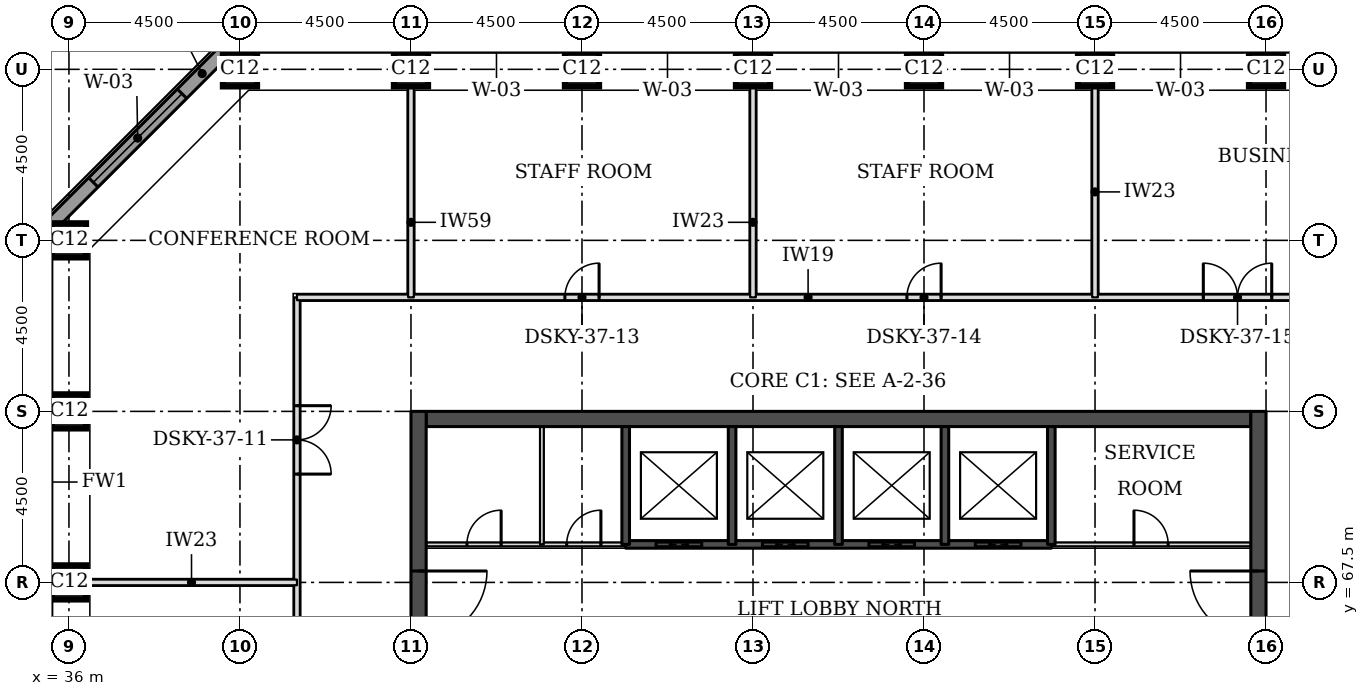
"""IFC4 building model, lengths in metres.
Left out: names, types, materials, properties, quantities, classifications, styles, units other than length and angle.
Written with IfcOpenShell. Run it as: python <this file> out.ifc"""

import sys

from ifc_helpers import new_model, si_unit, direction, frame, frame_2d, origin, origin_2d, place, context, subcontext, project, spatial, rectangle, extrude, element, fill, save


model = new_model("IFC4")
c1 = context("Model", 3, precision=1e-05, world=origin(), true_north=direction((0.0, 1.0)))
c2 = subcontext(c1, "Body", "Model", "MODEL_VIEW")
j1 = project(units=[si_unit("LENGTHUNIT", "METRE"), si_unit("PLANEANGLEUNIT", "RADIAN")], contexts=[c1])
p1 = place(None, origin())
s1 = spatial("IfcSite", under=j1, at=p1, CompositionType="ELEMENT")
p2 = place(p1, origin())
s2 = spatial("IfcBuilding", under=s1, at=p2, CompositionType="ELEMENT")
p3 = place(p2, frame((0.0, 0.0, 143.1)))
s3 = spatial("IfcBuildingStorey", under=s2, at=p3, CompositionType="ELEMENT", Elevation=143.1)
for number, where, z_axis, x_axis in (
    (1, (36.0, 67.5, 0.0), (0.0, 0.0, 1.0), (1.0, 0.0, 0.0)),
    (2, (36.0, 72.0, 0.0), (0.0, 0.0, 1.0), (1.0, 0.0, 0.0)),
    (3, (36.0, 76.5, 0.0), (0.0, 0.0, 1.0), (1.0, 0.0, 0.0)),
    (4, (40.5, 81.0, 0.0), (0.0, 0.0, 1.0), (1.0, 0.0, 0.0)),
    (5, (45.0, 81.0, 0.0), (0.0, 0.0, 1.0), (1.0, 0.0, 0.0)),
    (6, (49.5, 81.0, 0.0), (0.0, 0.0, 1.0), (1.0, 0.0, 0.0)),
    (7, (54.0, 81.0, 0.0), (0.0, 0.0, 1.0), (1.0, 0.0, 0.0)),
    (8, (58.5, 81.0, 0.0), (0.0, 0.0, 1.0), (1.0, 0.0, 0.0)),
    (9, (63.0, 81.0, 0.0), (0.0, 0.0, 1.0), (1.0, 0.0, 0.0)),
    (10, (67.5, 81.0, 0.0), (0.0, 0.0, 1.0), (1.0, 0.0, 0.0)),
):
    element("IfcColumn", number, at=place(p3, frame(where, z_axis=z_axis, x_axis=x_axis)), inside=s3, PredefinedType="COLUMN", context=c2, shape_type="SweptSolid", body=[
        extrude(rectangle(XDim=0.9, YDim=0.9, at=origin_2d()), origin(), (0.0, 0.0, 1.0), 4.6),
    ])
p4 = place(p3, frame((45.4, 71.8, 0.0), z_axis=(0.0, 0.0, 1.0), x_axis=(1.0, 0.0, 0.0)))
e11 = element("IfcWall", 11, at=p4, inside=s3, PredefinedType="SHEAR", context=c2, shape_type="SweptSolid", body=[
    extrude(rectangle(XDim=21.7, YDim=0.4, at=frame_2d((10.85, 0.0))), origin(), (0.0, 0.0, 1.0), 4.6),
])
p5 = place(p3, frame((45.2, 49.5, 0.0), z_axis=(0.0, 0.0, 1.0), x_axis=(0.0, 1.0, 0.0)))
e12 = element("IfcWall", 12, at=p5, inside=s3, PredefinedType="SHEAR", context=c2, shape_type="SweptSolid", body=[
    extrude(rectangle(XDim=22.5, YDim=0.4, at=frame_2d((11.25, 0.0))), origin(), (0.0, 0.0, 1.0), 4.6),
])
p6 = place(p5, frame((4.2, 0.0, 0.0)))
e13 = element("IfcOpeningElement", 13, at=p6, cuts=e12, PredefinedType="OPENING", context=c2, shape_type="SweptSolid", body=[
    extrude(rectangle(XDim=1.8, YDim=2.1, at=frame_2d((0.9, 1.05))), frame((0.0, 0.21, 0.0), z_axis=(0.0, -1.0, 0.0), x_axis=(1.0, 0.0, 0.0)), (0.0, 0.0, 1.0), 0.42),
])
p7 = place(p5, frame((6.9, 0.0, 0.0)))
e14 = element("IfcOpeningElement", 14, at=p7, cuts=e12, PredefinedType="OPENING", context=c2, shape_type="SweptSolid", body=[
    extrude(rectangle(XDim=1.1, YDim=2.1, at=frame_2d((0.55, 1.05))), frame((0.0, 0.21, 0.0), z_axis=(0.0, -1.0, 0.0), x_axis=(1.0, 0.0, 0.0)), (0.0, 0.0, 1.0), 0.42),
])
p8 = place(p5, frame((13.6, 0.0, 0.0)))
e15 = element("IfcOpeningElement", 15, at=p8, cuts=e12, PredefinedType="OPENING", context=c2, shape_type="SweptSolid", body=[
    extrude(rectangle(XDim=1.1, YDim=2.1, at=frame_2d((0.55, 1.05))), frame((0.0, 0.21, 0.0), z_axis=(0.0, -1.0, 0.0), x_axis=(1.0, 0.0, 0.0)), (0.0, 0.0, 1.0), 0.42),
])
p9 = place(p5, frame((16.5, 0.0, 0.0)))
e16 = element("IfcOpeningElement", 16, at=p9, cuts=e12, PredefinedType="OPENING", context=c2, shape_type="SweptSolid", body=[
    extrude(rectangle(XDim=1.8, YDim=2.1, at=frame_2d((0.9, 1.05))), frame((0.0, 0.21, 0.0), z_axis=(0.0, -1.0, 0.0), x_axis=(1.0, 0.0, 0.0)), (0.0, 0.0, 1.0), 0.42),
])
p10 = place(p3, frame((67.3, 49.5, 0.0), z_axis=(0.0, 0.0, 1.0), x_axis=(0.0, 1.0, 0.0)))
e17 = element("IfcWall", 17, at=p10, inside=s3, PredefinedType="SHEAR", context=c2, shape_type="SweptSolid", body=[
    extrude(rectangle(XDim=22.5, YDim=0.4, at=frame_2d((11.25, 0.0))), origin(), (0.0, 0.0, 1.0), 4.6),
])
p11 = place(p10, frame((4.2, 0.0, 0.0)))
e18 = element("IfcOpeningElement", 18, at=p11, cuts=e17, PredefinedType="OPENING", context=c2, shape_type="SweptSolid", body=[
    extrude(rectangle(XDim=1.8, YDim=2.1, at=frame_2d((0.9, 1.05))), frame((0.0, 0.21, 0.0), z_axis=(0.0, -1.0, 0.0), x_axis=(1.0, 0.0, 0.0)), (0.0, 0.0, 1.0), 0.42),
])
p12 = place(p10, frame((6.9, 0.0, 0.0)))
e19 = element("IfcOpeningElement", 19, at=p12, cuts=e17, PredefinedType="OPENING", context=c2, shape_type="SweptSolid", body=[
    extrude(rectangle(XDim=1.1, YDim=2.1, at=frame_2d((0.55, 1.05))), frame((0.0, 0.21, 0.0), z_axis=(0.0, -1.0, 0.0), x_axis=(1.0, 0.0, 0.0)), (0.0, 0.0, 1.0), 0.42),
])
p13 = place(p10, frame((13.6, 0.0, 0.0)))
e20 = element("IfcOpeningElement", 20, at=p13, cuts=e17, PredefinedType="OPENING", context=c2, shape_type="SweptSolid", body=[
    extrude(rectangle(XDim=1.1, YDim=2.1, at=frame_2d((0.55, 1.05))), frame((0.0, 0.21, 0.0), z_axis=(0.0, -1.0, 0.0), x_axis=(1.0, 0.0, 0.0)), (0.0, 0.0, 1.0), 0.42),
])
p14 = place(p10, frame((16.5, 0.0, 0.0)))
e21 = element("IfcOpeningElement", 21, at=p14, cuts=e17, PredefinedType="OPENING", context=c2, shape_type="SweptSolid", body=[
    extrude(rectangle(XDim=1.8, YDim=2.1, at=frame_2d((0.9, 1.05))), frame((0.0, 0.21, 0.0), z_axis=(0.0, -1.0, 0.0), x_axis=(1.0, 0.0, 0.0)), (0.0, 0.0, 1.0), 0.42),
])
p15 = place(p3, frame((40.292, 81.676, 0.0), z_axis=(0.0, 0.0, 1.0), x_axis=(-0.707106781187, -0.707106781187, 0.0)))
e22 = element("IfcWall", 22, at=p15, inside=s3, PredefinedType="STANDARD", context=c2, shape_type="SweptSolid", body=[
    extrude(rectangle(XDim=7.027, YDim=0.35, at=frame_2d((3.513, 0.0))), origin(), (0.0, 0.0, 1.0), 4.425),
])
p16 = place(p15, frame((1.863, 0.0, 0.9)))
e23 = element("IfcOpeningElement", 23, at=p16, cuts=e22, PredefinedType="OPENING", context=c2, shape_type="SweptSolid", body=[
    extrude(rectangle(XDim=3.3, YDim=2.7, at=frame_2d((1.65, 1.35))), frame((0.0, 0.185, 0.0), z_axis=(0.0, -1.0, 0.0), x_axis=(1.0, 0.0, 0.0)), (0.0, 0.0, 1.0), 0.37),
])
p17 = place(p3, frame((42.0, 53.25, 0.0), z_axis=(0.0, 0.0, 1.0), x_axis=(0.0, 1.0, 0.0)))
e24 = element("IfcWall", 24, at=p17, inside=s3, PredefinedType="PARTITIONING", context=c2, shape_type="SweptSolid", body=[
    extrude(rectangle(XDim=21.75, YDim=0.15, at=frame_2d((10.875, 0.0))), origin(), (0.0, 0.0, 1.0), 4.45),
])
p18 = place(p17, frame((2.175, 0.0, 0.0)))
e25 = element("IfcOpeningElement", 25, at=p18, cuts=e24, PredefinedType="OPENING", context=c2, shape_type="SweptSolid", body=[
    extrude(rectangle(XDim=0.9, YDim=2.1, at=frame_2d((0.45, 1.05))), frame((0.0, 0.085, 0.0), z_axis=(0.0, -1.0, 0.0), x_axis=(1.0, 0.0, 0.0)), (0.0, 0.0, 1.0), 0.17),
])
p19 = place(p17, frame((9.3, 0.0, 0.0)))
e26 = element("IfcOpeningElement", 26, at=p19, cuts=e24, PredefinedType="OPENING", context=c2, shape_type="SweptSolid", body=[
    extrude(rectangle(XDim=0.9, YDim=2.1, at=frame_2d((0.45, 1.05))), frame((0.0, 0.085, 0.0), z_axis=(0.0, -1.0, 0.0), x_axis=(1.0, 0.0, 0.0)), (0.0, 0.0, 1.0), 0.17),
])
p20 = place(p17, frame((17.1, 0.0, 0.0)))
e27 = element("IfcOpeningElement", 27, at=p20, cuts=e24, PredefinedType="OPENING", context=c2, shape_type="SweptSolid", body=[
    extrude(rectangle(XDim=1.8, YDim=2.1, at=frame_2d((0.9, 1.05))), frame((0.0, 0.085, 0.0), z_axis=(0.0, -1.0, 0.0), x_axis=(1.0, 0.0, 0.0)), (0.0, 0.0, 1.0), 0.17),
])
p21 = place(p3, frame((42.0, 75.0, 0.0), z_axis=(0.0, 0.0, 1.0), x_axis=(1.0, 0.0, 0.0)))
e28 = element("IfcWall", 28, at=p21, inside=s3, PredefinedType="PARTITIONING", context=c2, shape_type="SweptSolid", body=[
    extrude(rectangle(XDim=28.5, YDim=0.15, at=frame_2d((14.25, 0.0))), origin(), (0.0, 0.0, 1.0), 4.45),
])
p22 = place(p21, frame((23.85, 0.0, 0.0)))
e29 = element("IfcOpeningElement", 29, at=p22, cuts=e28, PredefinedType="OPENING", context=c2, shape_type="SweptSolid", body=[
    extrude(rectangle(XDim=1.8, YDim=2.4, at=frame_2d((0.9, 1.2))), frame((0.0, 0.085, 0.0), z_axis=(0.0, -1.0, 0.0), x_axis=(1.0, 0.0, 0.0)), (0.0, 0.0, 1.0), 0.17),
])
p23 = place(p21, frame((7.05, 0.0, 0.0)))
e30 = element("IfcOpeningElement", 30, at=p23, cuts=e28, PredefinedType="OPENING", context=c2, shape_type="SweptSolid", body=[
    extrude(rectangle(XDim=0.9, YDim=2.1, at=frame_2d((0.45, 1.05))), frame((0.0, 0.085, 0.0), z_axis=(0.0, -1.0, 0.0), x_axis=(1.0, 0.0, 0.0)), (0.0, 0.0, 1.0), 0.17),
])
p24 = place(p21, frame((16.05, 0.0, 0.0)))
e31 = element("IfcOpeningElement", 31, at=p24, cuts=e28, PredefinedType="OPENING", context=c2, shape_type="SweptSolid", body=[
    extrude(rectangle(XDim=0.9, YDim=2.1, at=frame_2d((0.45, 1.05))), frame((0.0, 0.085, 0.0), z_axis=(0.0, -1.0, 0.0), x_axis=(1.0, 0.0, 0.0)), (0.0, 0.0, 1.0), 0.17),
])
p25 = place(p3, frame((36.45, 67.5, 0.0), z_axis=(0.0, 0.0, 1.0), x_axis=(1.0, 0.0, 0.0)))
e32 = element("IfcWall", 32, at=p25, inside=s3, PredefinedType="PARTITIONING", context=c2, shape_type="SweptSolid", body=[
    extrude(rectangle(XDim=5.55, YDim=0.15, at=frame_2d((2.775, 0.0))), origin(), (0.0, 0.0, 1.0), 4.45),
])
p26 = place(p3, frame((45.0, 75.0, 0.0), z_axis=(0.0, 0.0, 1.0), x_axis=(0.0, 1.0, 0.0)))
e33 = element("IfcWall", 33, at=p26, inside=s3, PredefinedType="PARTITIONING", context=c2, shape_type="SweptSolid", body=[
    extrude(rectangle(XDim=5.55, YDim=0.15, at=frame_2d((2.775, 0.0))), origin(), (0.0, 0.0, 1.0), 3.922),
])
for number, where, z_axis, x_axis in (
    (34, (54.0, 75.0, 0.0), (0.0, 0.0, 1.0), (0.0, 1.0, 0.0)),
    (35, (63.0, 75.0, 0.0), (0.0, 0.0, 1.0), (0.0, 1.0, 0.0)),
):
    element("IfcWall", number, at=place(p3, frame(where, z_axis=z_axis, x_axis=x_axis)), inside=s3, PredefinedType="PARTITIONING", context=c2, shape_type="SweptSolid", body=[
        extrude(rectangle(XDim=5.55, YDim=0.15, at=frame_2d((2.775, 0.0))), origin(), (0.0, 0.0, 1.0), 4.45),
    ])
p27 = place(p3, frame((45.4, 68.5, 0.0), z_axis=(0.0, 0.0, 1.0), x_axis=(1.0, 0.0, 0.0)))
e36 = element("IfcWall", 36, at=p27, inside=s3, PredefinedType="PARTITIONING", context=c2, shape_type="SweptSolid", body=[
    extrude(rectangle(XDim=5.25, YDim=0.1, at=frame_2d((2.625, 0.0))), origin(), (0.0, 0.0, 1.0), 4.45),
])
p28 = place(p27, frame((1.073, 0.0, 0.0)))
e37 = element("IfcOpeningElement", 37, at=p28, cuts=e36, PredefinedType="OPENING", context=c2, shape_type="SweptSolid", body=[
    extrude(rectangle(XDim=0.9, YDim=2.1, at=frame_2d((0.45, 1.05))), frame((0.0, 0.06, 0.0), z_axis=(0.0, -1.0, 0.0), x_axis=(1.0, 0.0, 0.0)), (0.0, 0.0, 1.0), 0.12),
])
p29 = place(p27, frame((3.698, 0.0, 0.0)))
e38 = element("IfcOpeningElement", 38, at=p29, cuts=e36, PredefinedType="OPENING", context=c2, shape_type="SweptSolid", body=[
    extrude(rectangle(XDim=0.9, YDim=2.1, at=frame_2d((0.45, 1.05))), frame((0.0, 0.06, 0.0), z_axis=(0.0, -1.0, 0.0), x_axis=(1.0, 0.0, 0.0)), (0.0, 0.0, 1.0), 0.12),
])
p30 = place(p3, frame((61.85, 68.5, 0.0), z_axis=(0.0, 0.0, 1.0), x_axis=(1.0, 0.0, 0.0)))
e39 = element("IfcWall", 39, at=p30, inside=s3, PredefinedType="PARTITIONING", context=c2, shape_type="SweptSolid", body=[
    extrude(rectangle(XDim=5.25, YDim=0.1, at=frame_2d((2.625, 0.0))), origin(), (0.0, 0.0, 1.0), 4.45),
])
p31 = place(p30, frame((2.175, 0.0, 0.0)))
e40 = element("IfcOpeningElement", 40, at=p31, cuts=e39, PredefinedType="OPENING", context=c2, shape_type="SweptSolid", body=[
    extrude(rectangle(XDim=0.9, YDim=2.1, at=frame_2d((0.45, 1.05))), frame((0.0, 0.06, 0.0), z_axis=(0.0, -1.0, 0.0), x_axis=(1.0, 0.0, 0.0)), (0.0, 0.0, 1.0), 0.12),
])
p32 = place(p3, frame((50.65, 68.5, 0.0), z_axis=(0.0, 0.0, 1.0), x_axis=(1.0, 0.0, 0.0)))
e41 = element("IfcWall", 41, at=p32, inside=s3, PredefinedType="SOLIDWALL", context=c2, shape_type="SweptSolid", body=[
    extrude(rectangle(XDim=11.2, YDim=0.2, at=frame_2d((5.6, 0.0))), origin(), (0.0, 0.0, 1.0), 4.45),
])
p33 = place(p32, frame((0.8, 0.0, 0.0)))
e42 = element("IfcOpeningElement", 42, at=p33, cuts=e41, PredefinedType="OPENING", context=c2, shape_type="SweptSolid", body=[
    extrude(rectangle(XDim=1.2, YDim=2.1, at=frame_2d((0.6, 1.05))), frame((0.0, 0.11, 0.0), z_axis=(0.0, -1.0, 0.0), x_axis=(1.0, 0.0, 0.0)), (0.0, 0.0, 1.0), 0.22),
])
p34 = place(p32, frame((3.6, 0.0, 0.0)))
e43 = element("IfcOpeningElement", 43, at=p34, cuts=e41, PredefinedType="OPENING", context=c2, shape_type="SweptSolid", body=[
    extrude(rectangle(XDim=1.2, YDim=2.1, at=frame_2d((0.6, 1.05))), frame((0.0, 0.11, 0.0), z_axis=(0.0, -1.0, 0.0), x_axis=(1.0, 0.0, 0.0)), (0.0, 0.0, 1.0), 0.22),
])
p35 = place(p32, frame((6.4, 0.0, 0.0)))
e44 = element("IfcOpeningElement", 44, at=p35, cuts=e41, PredefinedType="OPENING", context=c2, shape_type="SweptSolid", body=[
    extrude(rectangle(XDim=1.2, YDim=2.1, at=frame_2d((0.6, 1.05))), frame((0.0, 0.11, 0.0), z_axis=(0.0, -1.0, 0.0), x_axis=(1.0, 0.0, 0.0)), (0.0, 0.0, 1.0), 0.22),
])
p36 = place(p32, frame((9.2, 0.0, 0.0)))
e45 = element("IfcOpeningElement", 45, at=p36, cuts=e41, PredefinedType="OPENING", context=c2, shape_type="SweptSolid", body=[
    extrude(rectangle(XDim=1.2, YDim=2.1, at=frame_2d((0.6, 1.05))), frame((0.0, 0.11, 0.0), z_axis=(0.0, -1.0, 0.0), x_axis=(1.0, 0.0, 0.0)), (0.0, 0.0, 1.0), 0.22),
])
p37 = place(p3, frame((48.445, 68.5, 0.0), z_axis=(0.0, 0.0, 1.0), x_axis=(0.0, 1.0, 0.0)))
e46 = element("IfcWall", 46, at=p37, inside=s3, PredefinedType="PARTITIONING", context=c2, shape_type="SweptSolid", body=[
    extrude(rectangle(XDim=3.1, YDim=0.1, at=frame_2d((1.55, 0.0))), origin(), (0.0, 0.0, 1.0), 4.45),
])
for number, where, z_axis, x_axis in (
    (47, (50.65, 68.5, 0.0), (0.0, 0.0, 1.0), (0.0, 1.0, 0.0)),
    (48, (53.45, 68.5, 0.0), (0.0, 0.0, 1.0), (0.0, 1.0, 0.0)),
    (49, (56.25, 68.5, 0.0), (0.0, 0.0, 1.0), (0.0, 1.0, 0.0)),
    (50, (59.05, 68.5, 0.0), (0.0, 0.0, 1.0), (0.0, 1.0, 0.0)),
    (51, (61.85, 68.5, 0.0), (0.0, 0.0, 1.0), (0.0, 1.0, 0.0)),
):
    element("IfcWall", number, at=place(p3, frame(where, z_axis=z_axis, x_axis=x_axis)), inside=s3, PredefinedType="SOLIDWALL", context=c2, shape_type="SweptSolid", body=[
        extrude(rectangle(XDim=3.1, YDim=0.2, at=frame_2d((1.55, 0.0))), origin(), (0.0, 0.0, 1.0), 4.45),
    ])
p38 = place(p16, origin())
e52 = element("IfcWindow", 52, at=p38, inside=s3, PartitioningType="SINGLE_PANEL", PredefinedType="WINDOW", context=c2, shape_type="SweptSolid", body=[
    extrude(rectangle(XDim=3.3, YDim=2.7, at=frame_2d((1.65, 1.35))), frame((0.0, 0.085, 0.0), z_axis=(0.0, -1.0, 0.0), x_axis=(1.0, 0.0, 0.0)), (0.0, 0.0, 1.0), 0.06),
])
fill(e23, e52)
p39 = place(p20, frame((1.8, 0.0, 0.0), z_axis=(0.0, 0.0, 1.0), x_axis=(-1.0, 0.0, 0.0)))
e53 = element("IfcDoor", 53, at=p39, inside=s3, OperationType="DOUBLE_DOOR_SINGLE_SWING", PredefinedType="DOOR", context=c2, shape_type="SweptSolid", body=[
    extrude(rectangle(XDim=1.8, YDim=2.1, at=frame_2d((0.9, 1.05))), frame((0.0, 0.025, 0.0), z_axis=(0.0, -1.0, 0.0), x_axis=(1.0, 0.0, 0.0)), (0.0, 0.0, 1.0), 0.05),
])
fill(e27, e53)
p40 = place(p22, origin())
e54 = element("IfcDoor", 54, at=p40, inside=s3, OperationType="DOUBLE_DOOR_SINGLE_SWING", PredefinedType="DOOR", context=c2, shape_type="SweptSolid", body=[
    extrude(rectangle(XDim=1.8, YDim=2.4, at=frame_2d((0.9, 1.2))), frame((0.0, 0.025, 0.0), z_axis=(0.0, -1.0, 0.0), x_axis=(1.0, 0.0, 0.0)), (0.0, 0.0, 1.0), 0.05),
])
fill(e29, e54)
p41 = place(p23, origin())
e55 = element("IfcDoor", 55, at=p41, inside=s3, OperationType="SINGLE_SWING_RIGHT", PredefinedType="DOOR", context=c2, shape_type="SweptSolid", body=[
    extrude(rectangle(XDim=0.9, YDim=2.1, at=frame_2d((0.45, 1.05))), frame((0.0, 0.025, 0.0), z_axis=(0.0, -1.0, 0.0), x_axis=(1.0, 0.0, 0.0)), (0.0, 0.0, 1.0), 0.05),
])
fill(e30, e55)
p42 = place(p24, origin())
e56 = element("IfcDoor", 56, at=p42, inside=s3, OperationType="SINGLE_SWING_RIGHT", PredefinedType="DOOR", context=c2, shape_type="SweptSolid", body=[
    extrude(rectangle(XDim=0.9, YDim=2.1, at=frame_2d((0.45, 1.05))), frame((0.0, 0.025, 0.0), z_axis=(0.0, -1.0, 0.0), x_axis=(1.0, 0.0, 0.0)), (0.0, 0.0, 1.0), 0.05),
])
fill(e31, e56)
p43 = place(p33, origin())
e57 = element("IfcDoor", 57, at=p43, inside=s3, OperationType="DOUBLE_DOOR_SLIDING", PredefinedType="DOOR", context=c2, shape_type="SweptSolid", body=[
    extrude(rectangle(XDim=1.2, YDim=2.1, at=frame_2d((0.6, 1.05))), frame((0.0, 0.025, 0.0), z_axis=(0.0, -1.0, 0.0), x_axis=(1.0, 0.0, 0.0)), (0.0, 0.0, 1.0), 0.05),
])
fill(e42, e57)
p44 = place(p34, origin())
e58 = element("IfcDoor", 58, at=p44, inside=s3, OperationType="DOUBLE_DOOR_SLIDING", PredefinedType="DOOR", context=c2, shape_type="SweptSolid", body=[
    extrude(rectangle(XDim=1.2, YDim=2.1, at=frame_2d((0.6, 1.05))), frame((0.0, 0.025, 0.0), z_axis=(0.0, -1.0, 0.0), x_axis=(1.0, 0.0, 0.0)), (0.0, 0.0, 1.0), 0.05),
])
fill(e43, e58)
p45 = place(p35, origin())
e59 = element("IfcDoor", 59, at=p45, inside=s3, OperationType="DOUBLE_DOOR_SLIDING", PredefinedType="DOOR", context=c2, shape_type="SweptSolid", body=[
    extrude(rectangle(XDim=1.2, YDim=2.1, at=frame_2d((0.6, 1.05))), frame((0.0, 0.025, 0.0), z_axis=(0.0, -1.0, 0.0), x_axis=(1.0, 0.0, 0.0)), (0.0, 0.0, 1.0), 0.05),
])
fill(e44, e59)
p46 = place(p36, origin())
e60 = element("IfcDoor", 60, at=p46, inside=s3, OperationType="DOUBLE_DOOR_SLIDING", PredefinedType="DOOR", context=c2, shape_type="SweptSolid", body=[
    extrude(rectangle(XDim=1.2, YDim=2.1, at=frame_2d((0.6, 1.05))), frame((0.0, 0.025, 0.0), z_axis=(0.0, -1.0, 0.0), x_axis=(1.0, 0.0, 0.0)), (0.0, 0.0, 1.0), 0.05),
])
fill(e45, e60)
p47 = place(p9, frame((1.8, 0.0, 0.0), z_axis=(0.0, 0.0, 1.0), x_axis=(-1.0, 0.0, 0.0)))
e61 = element("IfcDoor", 61, at=p47, inside=s3, OperationType="SINGLE_SWING_LEFT", PredefinedType="DOOR", context=c2, shape_type="SweptSolid", body=[
    extrude(rectangle(XDim=1.8, YDim=2.1, at=frame_2d((0.9, 1.05))), frame((0.0, 0.025, 0.0), z_axis=(0.0, -1.0, 0.0), x_axis=(1.0, 0.0, 0.0)), (0.0, 0.0, 1.0), 0.05),
])
fill(e16, e61)
p48 = place(p14, origin())
e62 = element("IfcDoor", 62, at=p48, inside=s3, OperationType="SINGLE_SWING_RIGHT", PredefinedType="DOOR", context=c2, shape_type="SweptSolid", body=[
    extrude(rectangle(XDim=1.8, YDim=2.1, at=frame_2d((0.9, 1.05))), frame((0.0, 0.025, 0.0), z_axis=(0.0, -1.0, 0.0), x_axis=(1.0, 0.0, 0.0)), (0.0, 0.0, 1.0), 0.05),
])
fill(e21, e62)
p49 = place(p31, origin())
e63 = element("IfcDoor", 63, at=p49, inside=s3, OperationType="SINGLE_SWING_LEFT", PredefinedType="DOOR", context=c2, shape_type="SweptSolid", body=[
    extrude(rectangle(XDim=0.9, YDim=2.1, at=frame_2d((0.45, 1.05))), frame((0.0, 0.025, 0.0), z_axis=(0.0, -1.0, 0.0), x_axis=(1.0, 0.0, 0.0)), (0.0, 0.0, 1.0), 0.05),
])
fill(e40, e63)
p50 = place(p28, origin())
e64 = element("IfcDoor", 64, at=p50, inside=s3, OperationType="SINGLE_SWING_RIGHT", PredefinedType="DOOR", context=c2, shape_type="SweptSolid", body=[
    extrude(rectangle(XDim=0.9, YDim=2.1, at=frame_2d((0.45, 1.05))), frame((0.0, 0.025, 0.0), z_axis=(0.0, -1.0, 0.0), x_axis=(1.0, 0.0, 0.0)), (0.0, 0.0, 1.0), 0.05),
])
fill(e37, e64)
p51 = place(p29, origin())
e65 = element("IfcDoor", 65, at=p51, inside=s3, OperationType="SINGLE_SWING_RIGHT", PredefinedType="DOOR", context=c2, shape_type="SweptSolid", body=[
    extrude(rectangle(XDim=0.9, YDim=2.1, at=frame_2d((0.45, 1.05))), frame((0.0, 0.025, 0.0), z_axis=(0.0, -1.0, 0.0), x_axis=(1.0, 0.0, 0.0)), (0.0, 0.0, 1.0), 0.05),
])
fill(e38, e65)
save(model, sys.argv[1])
